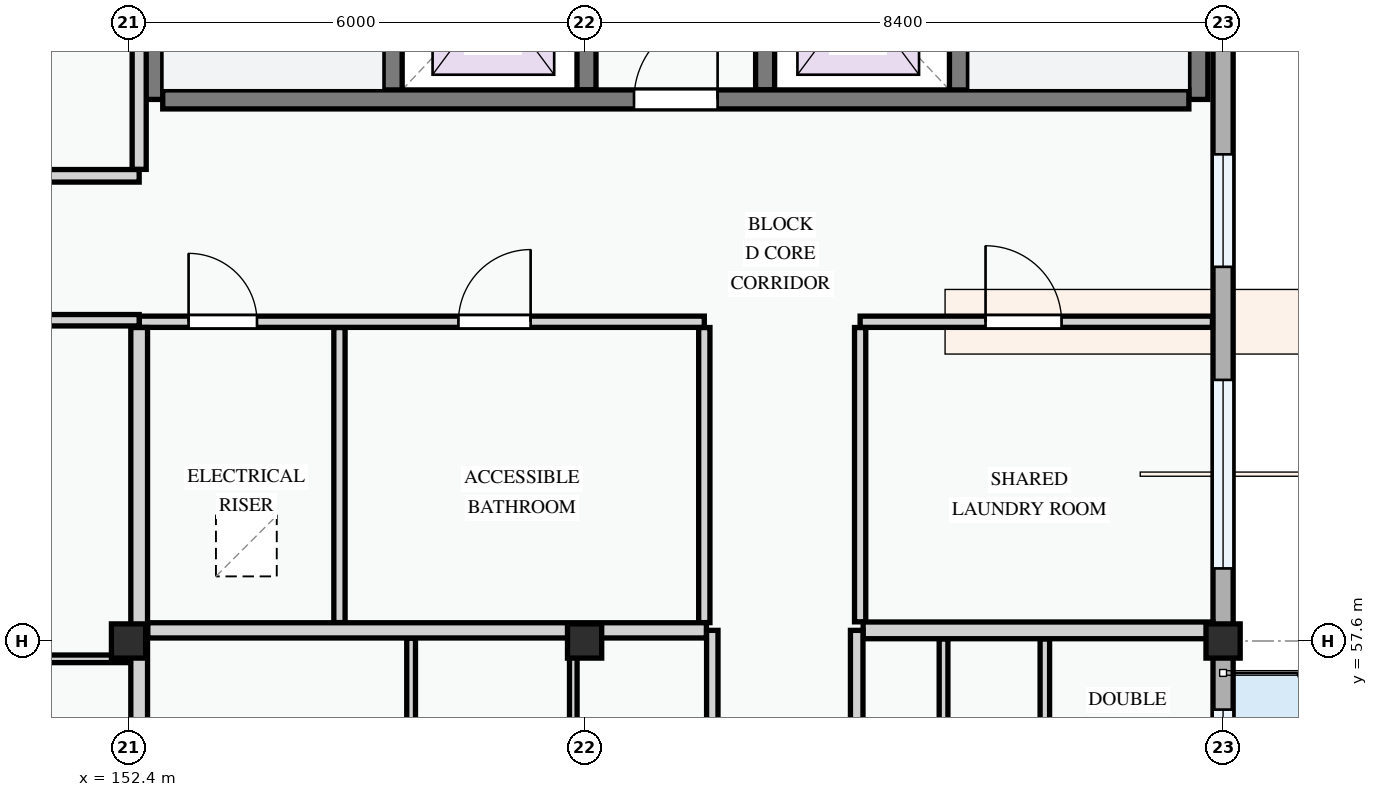
"""IFC4 building model, lengths in metres.
Left out: names, types, materials, properties, quantities, classifications, styles, units other than length and angle.
Written with IfcOpenShell. Run it as: python <this file> out.ifc"""

import sys

from ifc_helpers import new_model, si_unit, direction, frame, frame_2d, origin, origin_2d, place, context, subcontext, project, spatial, rectangle, extrude, element, fill, save


model = new_model("IFC4")
c1 = context("Model", 3, precision=1e-05, world=origin(), true_north=direction((0.0, 1.0)))
c2 = subcontext(c1, "Body", "Model", "MODEL_VIEW")
j1 = project(units=[si_unit("LENGTHUNIT", "METRE"), si_unit("PLANEANGLEUNIT", "RADIAN")], contexts=[c1])
p1 = place(None, origin())
s1 = spatial("IfcSite", under=j1, at=p1, CompositionType="ELEMENT")
p2 = place(p1, origin())
s2 = spatial("IfcBuilding", under=s1, at=p2, CompositionType="ELEMENT")
p3 = place(p2, frame((0.0, 0.0, 24.6)))
s3 = spatial("IfcBuildingStorey", under=s2, at=p3, CompositionType="ELEMENT", Elevation=24.6)
for number, where, z_axis, x_axis in (
    (1, (152.4, 57.6, 0.0), (0.0, 0.0, 1.0), (1.0, 0.0, 0.0)),
    (2, (158.4, 57.6, 0.0), (0.0, 0.0, 1.0), (1.0, 0.0, 0.0)),
    (3, (166.8, 57.6, 0.0), (0.0, 0.0, 1.0), (1.0, 0.0, 0.0)),
):
    element("IfcColumn", number, at=place(p3, frame(where, z_axis=z_axis, x_axis=x_axis)), inside=s3, PredefinedType="COLUMN", context=c2, shape_type="SweptSolid", body=[
        extrude(rectangle(XDim=0.45, YDim=0.45, at=origin_2d()), origin(), (0.0, 0.0, 1.0), 3.3),
    ])
p4 = place(p3, frame((166.8, 51.6, 0.0), z_axis=(0.0, 0.0, 1.0), x_axis=(0.0, 1.0, 0.0)))
e4 = element("IfcWall", 4, at=p4, inside=s3, PredefinedType="STANDARD", context=c2, shape_type="SweptSolid", body=[
    extrude(rectangle(XDim=6.0, YDim=0.265, at=frame_2d((3.0, 0.0))), origin(), (0.0, 0.0, 1.0), 2.575),
])
p5 = place(p4, frame((2.085, 0.0, 0.0)))
e5 = element("IfcOpeningElement", 5, at=p5, cuts=e4, PredefinedType="OPENING", context=c2, shape_type="SweptSolid", body=[
    extrude(rectangle(XDim=1.05, YDim=2.15, at=frame_2d((0.525, 1.075))), frame((0.0, 0.143, 0.0), z_axis=(0.0, -1.0, 0.0), x_axis=(1.0, 0.0, 0.0)), (0.0, 0.0, 1.0), 0.285),
])
p6 = place(p4, frame((0.472, 0.0, 0.78)))
e6 = element("IfcOpeningElement", 6, at=p6, cuts=e4, PredefinedType="OPENING", context=c2, shape_type="SweptSolid", body=[
    extrude(rectangle(XDim=1.0, YDim=1.25, at=frame_2d((0.5, 0.625))), frame((0.0, 0.143, 0.0), z_axis=(0.0, -1.0, 0.0), x_axis=(1.0, 0.0, 0.0)), (0.0, 0.0, 1.0), 0.285),
])
p7 = place(p4, frame((3.897, 0.0, 0.78)))
e7 = element("IfcOpeningElement", 7, at=p7, cuts=e4, PredefinedType="OPENING", context=c2, shape_type="SweptSolid", body=[
    extrude(rectangle(XDim=1.2, YDim=1.35, at=frame_2d((0.6, 0.675))), frame((0.0, 0.143, 0.0), z_axis=(0.0, -1.0, 0.0), x_axis=(1.0, 0.0, 0.0)), (0.0, 0.0, 1.0), 0.285),
])
p8 = place(p3, frame((166.8, 57.6, 0.0), z_axis=(0.0, 0.0, 1.0), x_axis=(0.0, 1.0, 0.0)))
e8 = element("IfcWall", 8, at=p8, inside=s3, PredefinedType="STANDARD", context=c2, shape_type="SweptSolid", body=[
    extrude(rectangle(XDim=8.4, YDim=0.265, at=frame_2d((4.2, 0.0))), origin(), (0.0, 0.0, 1.0), 2.425),
])
p9 = place(p8, frame((0.955, 0.0, 0.78)))
e9 = element("IfcOpeningElement", 9, at=p9, cuts=e8, PredefinedType="OPENING", context=c2, shape_type="SweptSolid", body=[
    extrude(rectangle(XDim=2.48, YDim=1.46, at=frame_2d((1.24, 0.73))), frame((0.0, 0.143, 0.0), z_axis=(0.0, -1.0, 0.0), x_axis=(1.0, 0.0, 0.0)), (0.0, 0.0, 1.0), 0.285),
])
p10 = place(p8, frame((4.923, 0.0, 0.78)))
e10 = element("IfcOpeningElement", 10, at=p10, cuts=e8, PredefinedType="OPENING", context=c2, shape_type="SweptSolid", body=[
    extrude(rectangle(XDim=1.48, YDim=1.52, at=frame_2d((0.74, 0.76))), frame((0.0, 0.143, 0.0), z_axis=(0.0, -1.0, 0.0), x_axis=(1.0, 0.0, 0.0)), (0.0, 0.0, 1.0), 0.285),
])
p11 = place(p3, frame((155.875, 71.65, 0.0), z_axis=(0.0, 0.0, 1.0), x_axis=(0.0, -1.0, 0.0)))
e11 = element("IfcWall", 11, at=p11, inside=s3, PredefinedType="SHEAR", context=c2, shape_type="SweptSolid", body=[
    extrude(rectangle(XDim=6.925, YDim=0.25, at=frame_2d((3.462, 0.0))), origin(), (0.0, 0.0, 1.0), 3.0),
])
p12 = place(p11, frame((0.35, 0.0, 0.0)))
e12 = element("IfcOpeningElement", 12, at=p12, cuts=e11, PredefinedType="OPENING", context=c2, shape_type="SweptSolid", body=[
    extrude(rectangle(XDim=0.95, YDim=2.1, at=frame_2d((0.475, 1.05))), frame((0.0, 0.135, 0.0), z_axis=(0.0, -1.0, 0.0), x_axis=(1.0, 0.0, 0.0)), (0.0, 0.0, 1.0), 0.27),
])
p13 = place(p3, frame((152.725, 71.8, 0.0), z_axis=(0.0, 0.0, 1.0), x_axis=(0.0, -1.0, 0.0)))
e13 = element("IfcWall", 13, at=p13, inside=s3, PredefinedType="SHEAR", context=c2, shape_type="SweptSolid", body=[
    extrude(rectangle(XDim=7.075, YDim=0.25, at=frame_2d((3.538, 0.0))), origin(), (0.0, 0.0, 1.0), 3.0),
])
p14 = place(p3, frame((166.475, 71.65, 0.0), z_axis=(0.0, 0.0, 1.0), x_axis=(0.0, -1.0, 0.0)))
e14 = element("IfcWall", 14, at=p14, inside=s3, PredefinedType="SHEAR", context=c2, shape_type="SweptSolid", body=[
    extrude(rectangle(XDim=6.925, YDim=0.25, at=frame_2d((3.462, 0.0))), origin(), (0.0, 0.0, 1.0), 3.0),
])
p15 = place(p3, frame((163.325, 71.65, 0.0), z_axis=(0.0, 0.0, 1.0), x_axis=(0.0, -1.0, 0.0)))
e15 = element("IfcWall", 15, at=p15, inside=s3, PredefinedType="SHEAR", context=c2, shape_type="SweptSolid", body=[
    extrude(rectangle(XDim=6.925, YDim=0.25, at=frame_2d((3.462, 0.0))), origin(), (0.0, 0.0, 1.0), 3.0),
])
p16 = place(p15, frame((0.35, 0.0, 0.0)))
e16 = element("IfcOpeningElement", 16, at=p16, cuts=e15, PredefinedType="OPENING", context=c2, shape_type="SweptSolid", body=[
    extrude(rectangle(XDim=0.95, YDim=2.1, at=frame_2d((0.475, 1.05))), frame((0.0, 0.135, 0.0), z_axis=(0.0, -1.0, 0.0), x_axis=(1.0, 0.0, 0.0)), (0.0, 0.0, 1.0), 0.27),
])
for number, where, z_axis, x_axis in (
    (17, (158.425, 67.275, 0.0), (0.0, 0.0, 1.0), (0.0, -1.0, 0.0)),
    (18, (160.775, 67.275, 0.0), (0.0, 0.0, 1.0), (0.0, -1.0, 0.0)),
):
    element("IfcWall", number, at=place(p3, frame(where, z_axis=z_axis, x_axis=x_axis)), inside=s3, PredefinedType="SHEAR", context=c2, shape_type="SweptSolid", body=[
        extrude(rectangle(XDim=2.425, YDim=0.25, at=frame_2d((1.212, 0.0))), origin(), (0.0, 0.0, 1.0), 3.0),
    ])
p17 = place(p3, frame((152.85, 64.725, 0.0), z_axis=(0.0, 0.0, 1.0), x_axis=(1.0, 0.0, 0.0)))
e19 = element("IfcWall", 19, at=p17, inside=s3, PredefinedType="SHEAR", context=c2, shape_type="SweptSolid", body=[
    extrude(rectangle(XDim=13.5, YDim=0.25, at=frame_2d((6.75, 0.0))), origin(), (0.0, 0.0, 1.0), 3.0),
])
p18 = place(p17, frame((6.2, 0.0, 0.0)))
e20 = element("IfcOpeningElement", 20, at=p18, cuts=e19, PredefinedType="OPENING", context=c2, shape_type="SweptSolid", body=[
    extrude(rectangle(XDim=1.1, YDim=2.15, at=frame_2d((0.55, 1.075))), frame((0.0, 0.135, 0.0), z_axis=(0.0, -1.0, 0.0), x_axis=(1.0, 0.0, 0.0)), (0.0, 0.0, 1.0), 0.27),
])
for number, where, z_axis, x_axis in (
    (21, (155.175, 61.724, 0.0), (0.0, 0.0, 1.0), (0.0, -1.0, 0.0)),
    (22, (159.975, 61.724, 0.0), (0.0, 0.0, 1.0), (0.0, -1.0, 0.0)),
):
    element("IfcWall", number, at=place(p3, frame(where, z_axis=z_axis, x_axis=x_axis)), inside=s3, PredefinedType="PARTITIONING", context=c2, shape_type="SweptSolid", body=[
        extrude(rectangle(XDim=3.882, YDim=0.148, at=frame_2d((1.941, 0.0))), origin(), (0.0, 0.0, 1.0), 3.0),
    ])
p19 = place(p3, frame((162.025, 61.724, 0.0), z_axis=(0.0, 0.0, 1.0), x_axis=(0.0, -1.0, 0.0)))
e23 = element("IfcWall", 23, at=p19, inside=s3, PredefinedType="PARTITIONING", context=c2, shape_type="SweptSolid", body=[
    extrude(rectangle(XDim=3.872, YDim=0.148, at=frame_2d((1.936, 0.0))), origin(), (0.0, 0.0, 1.0), 3.0),
])
p20 = place(p3, frame((152.54, 61.8, 0.0), z_axis=(0.0, 0.0, 1.0), x_axis=(1.0, 0.0, 0.0)))
e24 = element("IfcWall", 24, at=p20, inside=s3, PredefinedType="PARTITIONING", context=c2, shape_type="SweptSolid", body=[
    extrude(rectangle(XDim=7.435, YDim=0.148, at=frame_2d((3.718, 0.0))), origin(), (0.0, 0.0, 1.0), 3.0),
])
p21 = place(p20, frame((0.65, 0.0, 0.0)))
e25 = element("IfcOpeningElement", 25, at=p21, cuts=e24, PredefinedType="OPENING", context=c2, shape_type="SweptSolid", body=[
    extrude(rectangle(XDim=0.9, YDim=2.1, at=frame_2d((0.45, 1.05))), frame((0.0, 0.084, 0.0), z_axis=(0.0, -1.0, 0.0), x_axis=(1.0, 0.0, 0.0)), (0.0, 0.0, 1.0), 0.168),
])
p22 = place(p20, frame((4.2, 0.0, 0.0)))
e26 = element("IfcOpeningElement", 26, at=p22, cuts=e24, PredefinedType="OPENING", context=c2, shape_type="SweptSolid", body=[
    extrude(rectangle(XDim=0.95, YDim=2.1, at=frame_2d((0.475, 1.05))), frame((0.0, 0.084, 0.0), z_axis=(0.0, -1.0, 0.0), x_axis=(1.0, 0.0, 0.0)), (0.0, 0.0, 1.0), 0.168),
])
p23 = place(p3, frame((162.025, 61.8, 0.0), z_axis=(0.0, 0.0, 1.0), x_axis=(1.0, 0.0, 0.0)))
e27 = element("IfcWall", 27, at=p23, inside=s3, PredefinedType="PARTITIONING", context=c2, shape_type="SweptSolid", body=[
    extrude(rectangle(XDim=4.635, YDim=0.148, at=frame_2d((2.317, 0.0))), origin(), (0.0, 0.0, 1.0), 3.0),
])
p24 = place(p23, frame((1.65, 0.0, 0.0)))
e28 = element("IfcOpeningElement", 28, at=p24, cuts=e27, PredefinedType="OPENING", context=c2, shape_type="SweptSolid", body=[
    extrude(rectangle(XDim=1.0, YDim=2.15, at=frame_2d((0.5, 1.075))), frame((0.0, 0.084, 0.0), z_axis=(0.0, -1.0, 0.0), x_axis=(1.0, 0.0, 0.0)), (0.0, 0.0, 1.0), 0.168),
])
p25 = place(p3, frame((156.118, 53.399, 0.0), z_axis=(0.0, 0.0, 1.0), x_axis=(0.0, 1.0, 0.0)))
e29 = element("IfcWall", 29, at=p25, inside=s3, PredefinedType="PARTITIONING", context=c2, shape_type="SweptSolid", body=[
    extrude(rectangle(XDim=4.239, YDim=0.115, at=frame_2d((2.119, 0.0))), origin(), (0.0, 0.0, 1.0), 3.0),
])
p26 = place(p3, frame((158.251, 53.399, 0.0), z_axis=(0.0, 0.0, 1.0), x_axis=(0.0, 1.0, 0.0)))
e30 = element("IfcWall", 30, at=p26, inside=s3, PredefinedType="PARTITIONING", context=c2, shape_type="SweptSolid", body=[
    extrude(rectangle(XDim=4.239, YDim=0.1, at=frame_2d((2.119, 0.0))), origin(), (0.0, 0.0, 1.0), 2.575),
])
p27 = place(p3, frame((164.455, 53.427, 0.0), z_axis=(0.0, 0.0, 1.0), x_axis=(0.0, 1.0, 0.0)))
e31 = element("IfcWall", 31, at=p27, inside=s3, PredefinedType="PARTITIONING", context=c2, shape_type="SweptSolid", body=[
    extrude(rectangle(XDim=4.201, YDim=0.125, at=frame_2d((2.101, 0.0))), origin(), (0.0, 0.0, 1.0), 3.0),
])
p28 = place(p3, frame((163.122, 53.427, 0.0), z_axis=(0.0, 0.0, 1.0), x_axis=(0.0, 1.0, 0.0)))
e32 = element("IfcWall", 32, at=p28, inside=s3, PredefinedType="PARTITIONING", context=c2, shape_type="SweptSolid", body=[
    extrude(rectangle(XDim=4.201, YDim=0.115, at=frame_2d((2.101, 0.0))), origin(), (0.0, 0.0, 1.0), 3.0),
])
p29 = place(p3, frame((152.652, 57.74, 0.0), z_axis=(0.0, 0.0, 1.0), x_axis=(1.0, 0.0, 0.0)))
e33 = element("IfcWall", 33, at=p29, inside=s3, PredefinedType="PARTITIONING", context=c2, shape_type="SweptSolid", body=[
    extrude(rectangle(XDim=7.351, YDim=0.2, at=frame_2d((3.675, 0.0))), origin(), (0.0, 0.0, 1.0), 2.375),
])
p30 = place(p3, frame((162.064, 57.74, 0.0), z_axis=(0.0, 0.0, 1.0), x_axis=(1.0, 0.0, 0.0)))
e34 = element("IfcWall", 34, at=p30, inside=s3, PredefinedType="PARTITIONING", context=c2, shape_type="SweptSolid", body=[
    extrude(rectangle(XDim=4.601, YDim=0.22, at=frame_2d((2.301, 0.0))), origin(), (0.0, 0.0, 1.0), 2.375),
])
p31 = place(p3, frame((160.08, 37.334, 0.0), z_axis=(0.0, 0.0, 1.0), x_axis=(0.0, 1.0, 0.0)))
e35 = element("IfcWall", 35, at=p31, inside=s3, PredefinedType="PARTITIONING", context=c2, shape_type="SweptSolid", body=[
    extrude(rectangle(XDim=20.406, YDim=0.15, at=frame_2d((10.203, 0.0))), origin(), (0.0, 0.0, 1.0), 3.0),
])
p32 = place(p31, frame((2.349, 0.0, 0.0)))
e36 = element("IfcOpeningElement", 36, at=p32, cuts=e35, PredefinedType="OPENING", context=c2, shape_type="SweptSolid", body=[
    extrude(rectangle(XDim=0.92, YDim=2.1, at=frame_2d((0.46, 1.05))), frame((0.0, 0.085, 0.0), z_axis=(0.0, -1.0, 0.0), x_axis=(1.0, 0.0, 0.0)), (0.0, 0.0, 1.0), 0.17),
])
p33 = place(p31, frame((11.646, 0.0, 0.0)))
e37 = element("IfcOpeningElement", 37, at=p33, cuts=e35, PredefinedType="OPENING", context=c2, shape_type="SweptSolid", body=[
    extrude(rectangle(XDim=0.92, YDim=2.1, at=frame_2d((0.46, 1.05))), frame((0.0, 0.085, 0.0), z_axis=(0.0, -1.0, 0.0), x_axis=(1.0, 0.0, 0.0)), (0.0, 0.0, 1.0), 0.17),
])
p34 = place(p3, frame((161.98, 37.334, 0.0), z_axis=(0.0, 0.0, 1.0), x_axis=(0.0, 1.0, 0.0)))
e38 = element("IfcWall", 38, at=p34, inside=s3, PredefinedType="PARTITIONING", context=c2, shape_type="SweptSolid", body=[
    extrude(rectangle(XDim=20.406, YDim=0.165, at=frame_2d((10.203, 0.0))), origin(), (0.0, 0.0, 1.0), 3.0),
])
p35 = place(p34, frame((2.406, 0.0, 0.0)))
e39 = element("IfcOpeningElement", 39, at=p35, cuts=e38, PredefinedType="OPENING", context=c2, shape_type="SweptSolid", body=[
    extrude(rectangle(XDim=0.92, YDim=2.1, at=frame_2d((0.46, 1.05))), frame((0.0, 0.093, 0.0), z_axis=(0.0, -1.0, 0.0), x_axis=(1.0, 0.0, 0.0)), (0.0, 0.0, 1.0), 0.185),
])
p36 = place(p34, frame((11.646, 0.0, 0.0)))
e40 = element("IfcOpeningElement", 40, at=p36, cuts=e38, PredefinedType="OPENING", context=c2, shape_type="SweptSolid", body=[
    extrude(rectangle(XDim=0.92, YDim=2.1, at=frame_2d((0.46, 1.05))), frame((0.0, 0.093, 0.0), z_axis=(0.0, -1.0, 0.0), x_axis=(1.0, 0.0, 0.0)), (0.0, 0.0, 1.0), 0.185),
])
p37 = place(p3, frame((145.865, 57.365, 0.0), z_axis=(0.0, 0.0, 1.0), x_axis=(1.0, 0.0, 0.0)))
e41 = element("IfcWall", 41, at=p37, inside=s3, PredefinedType="PARTITIONING", context=c2, shape_type="SweptSolid", body=[
    extrude(rectangle(XDim=6.563, YDim=0.1, at=frame_2d((3.282, 0.0))), origin(), (0.0, 0.0, 1.0), 2.375),
])
p38 = place(p3, frame((152.54, 43.26, 0.0), z_axis=(0.0, 0.0, 1.0), x_axis=(0.0, 1.0, 0.0)))
e42 = element("IfcWall", 42, at=p38, inside=s3, PredefinedType="PARTITIONING", context=c2, shape_type="SweptSolid", body=[
    extrude(rectangle(XDim=18.464, YDim=0.22, at=frame_2d((9.232, 0.0))), origin(), (0.0, 0.0, 1.0), 2.425),
])
p39 = place(p3, frame((152.54, 63.804, 0.0), z_axis=(0.0, 0.0, 1.0), x_axis=(0.0, 1.0, 0.0)))
e43 = element("IfcWall", 43, at=p39, inside=s3, PredefinedType="PARTITIONING", context=c2, shape_type="SweptSolid", body=[
    extrude(rectangle(XDim=8.061, YDim=0.185, at=frame_2d((4.031, 0.0))), origin(), (0.0, 0.0, 1.0), 2.425),
])
p40 = place(p3, frame((138.06, 61.82, 0.0), z_axis=(0.0, 0.0, 1.0), x_axis=(1.0, 0.0, 0.0)))
e44 = element("IfcWall", 44, at=p40, inside=s3, PredefinedType="PARTITIONING", context=c2, shape_type="SweptSolid", body=[
    extrude(rectangle(XDim=14.48, YDim=0.15, at=frame_2d((7.24, 0.0))), origin(), (0.0, 0.0, 1.0), 3.0),
])
p41 = place(p40, frame((2.409, 0.0, 0.0)))
e45 = element("IfcOpeningElement", 45, at=p41, cuts=e44, PredefinedType="OPENING", context=c2, shape_type="SweptSolid", body=[
    extrude(rectangle(XDim=0.92, YDim=2.1, at=frame_2d((0.46, 1.05))), frame((0.0, 0.085, 0.0), z_axis=(0.0, -1.0, 0.0), x_axis=(1.0, 0.0, 0.0)), (0.0, 0.0, 1.0), 0.17),
])
p42 = place(p3, frame((138.06, 63.72, 0.0), z_axis=(0.0, 0.0, 1.0), x_axis=(1.0, 0.0, 0.0)))
e46 = element("IfcWall", 46, at=p42, inside=s3, PredefinedType="PARTITIONING", context=c2, shape_type="SweptSolid", body=[
    extrude(rectangle(XDim=14.48, YDim=0.165, at=frame_2d((7.24, 0.0))), origin(), (0.0, 0.0, 1.0), 3.0),
])
p43 = place(p42, frame((2.412, 0.0, 0.0)))
e47 = element("IfcOpeningElement", 47, at=p43, cuts=e46, PredefinedType="OPENING", context=c2, shape_type="SweptSolid", body=[
    extrude(rectangle(XDim=0.92, YDim=2.1, at=frame_2d((0.46, 1.05))), frame((0.0, 0.093, 0.0), z_axis=(0.0, -1.0, 0.0), x_axis=(1.0, 0.0, 0.0)), (0.0, 0.0, 1.0), 0.185),
])
p44 = place(p7, origin())
e48 = element("IfcWindow", 48, at=p44, inside=s3, PartitioningType="SINGLE_PANEL", PredefinedType="WINDOW", context=c2, shape_type="SweptSolid", body=[
    extrude(rectangle(XDim=1.2, YDim=1.35, at=frame_2d((0.6, 0.675))), frame((0.0, 0.03, 0.0), z_axis=(0.0, -1.0, 0.0), x_axis=(1.0, 0.0, 0.0)), (0.0, 0.0, 1.0), 0.06),
])
fill(e7, e48)
p45 = place(p9, origin())
e49 = element("IfcWindow", 49, at=p45, inside=s3, PartitioningType="DOUBLE_PANEL_VERTICAL", PredefinedType="WINDOW", context=c2, shape_type="SweptSolid", body=[
    extrude(rectangle(XDim=2.48, YDim=1.46, at=frame_2d((1.24, 0.73))), frame((0.0, 0.03, 0.0), z_axis=(0.0, -1.0, 0.0), x_axis=(1.0, 0.0, 0.0)), (0.0, 0.0, 1.0), 0.06),
])
fill(e9, e49)
p46 = place(p10, origin())
e50 = element("IfcWindow", 50, at=p46, inside=s3, PartitioningType="SINGLE_PANEL", PredefinedType="WINDOW", context=c2, shape_type="SweptSolid", body=[
    extrude(rectangle(XDim=1.48, YDim=1.52, at=frame_2d((0.74, 0.76))), frame((0.0, 0.03, 0.0), z_axis=(0.0, -1.0, 0.0), x_axis=(1.0, 0.0, 0.0)), (0.0, 0.0, 1.0), 0.06),
])
fill(e10, e50)
p47 = place(p18, origin())
e51 = element("IfcDoor", 51, at=p47, inside=s3, OperationType="SINGLE_SWING_RIGHT", PredefinedType="DOOR", context=c2, shape_type="SweptSolid", body=[
    extrude(rectangle(XDim=1.1, YDim=2.15, at=frame_2d((0.55, 1.075))), frame((0.0, 0.025, 0.0), z_axis=(0.0, -1.0, 0.0), x_axis=(1.0, 0.0, 0.0)), (0.0, 0.0, 1.0), 0.05),
])
fill(e20, e51)
p48 = place(p21, origin())
e52 = element("IfcDoor", 52, at=p48, inside=s3, OperationType="SINGLE_SWING_LEFT", PredefinedType="DOOR", context=c2, shape_type="SweptSolid", body=[
    extrude(rectangle(XDim=0.9, YDim=2.1, at=frame_2d((0.45, 1.05))), frame((0.0, 0.025, 0.0), z_axis=(0.0, -1.0, 0.0), x_axis=(1.0, 0.0, 0.0)), (0.0, 0.0, 1.0), 0.05),
])
fill(e25, e52)
p49 = place(p22, origin())
e53 = element("IfcDoor", 53, at=p49, inside=s3, OperationType="SINGLE_SWING_RIGHT", PredefinedType="DOOR", context=c2, shape_type="SweptSolid", body=[
    extrude(rectangle(XDim=0.95, YDim=2.1, at=frame_2d((0.475, 1.05))), frame((0.0, 0.025, 0.0), z_axis=(0.0, -1.0, 0.0), x_axis=(1.0, 0.0, 0.0)), (0.0, 0.0, 1.0), 0.05),
])
fill(e26, e53)
p50 = place(p24, origin())
e54 = element("IfcDoor", 54, at=p50, inside=s3, OperationType="SINGLE_SWING_LEFT", PredefinedType="DOOR", context=c2, shape_type="SweptSolid", body=[
    extrude(rectangle(XDim=1.0, YDim=2.15, at=frame_2d((0.5, 1.075))), frame((0.0, 0.025, 0.0), z_axis=(0.0, -1.0, 0.0), x_axis=(1.0, 0.0, 0.0)), (0.0, 0.0, 1.0), 0.05),
])
fill(e28, e54)
save(model, sys.argv[1])
